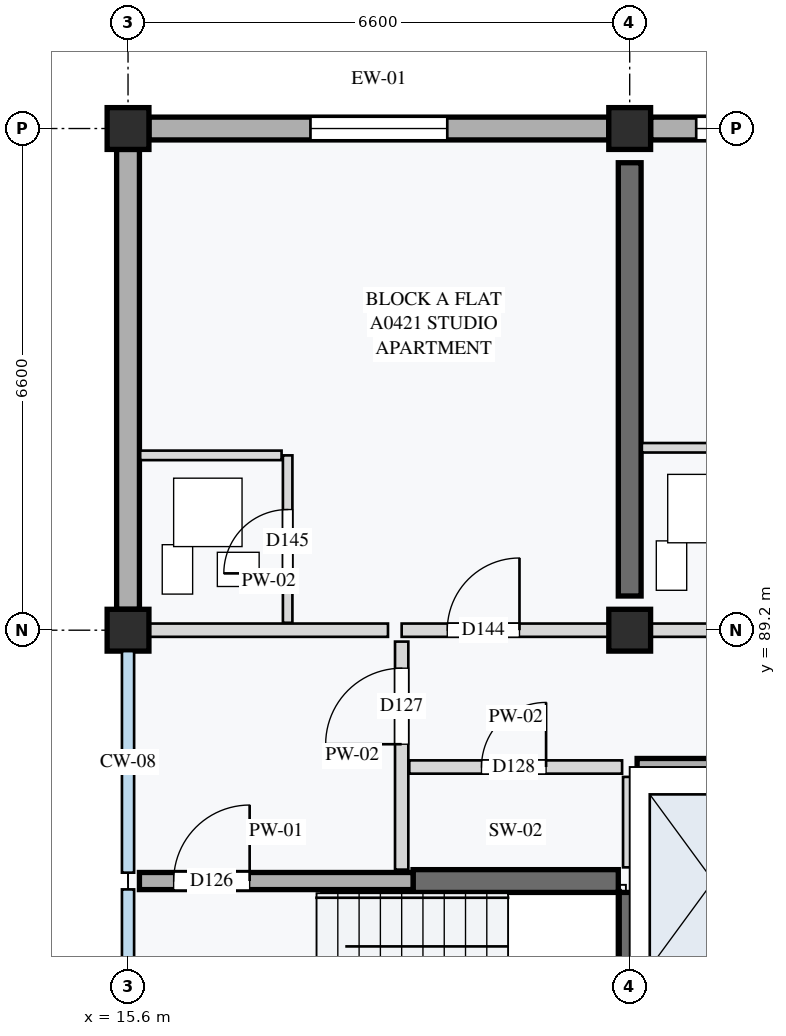
"""IFC4 building model, lengths in metres.
Left out: names, types, materials, properties, quantities, classifications, styles, units other than length and angle.
Written with IfcOpenShell. Run it as: python <this file> out.ifc"""

import sys

from ifc_helpers import new_model, si_unit, direction, frame, frame_2d, origin, origin_2d, place, context, subcontext, project, spatial, rectangle, extrude, element, fill, save


model = new_model("IFC4")
c1 = context("Model", 3, precision=1e-05, world=origin(), true_north=direction((0.0, 1.0)))
c2 = subcontext(c1, "Body", "Model", "MODEL_VIEW")
j1 = project(units=[si_unit("LENGTHUNIT", "METRE"), si_unit("PLANEANGLEUNIT", "RADIAN")], contexts=[c1])
p1 = place(None, origin())
s1 = spatial("IfcSite", under=j1, at=p1, CompositionType="ELEMENT")
p2 = place(p1, origin())
s2 = spatial("IfcBuilding", under=s1, at=p2, CompositionType="ELEMENT")
p3 = place(p2, frame((0.0, 0.0, 14.8)))
s3 = spatial("IfcBuildingStorey", under=s2, at=p3, CompositionType="ELEMENT", Elevation=14.8)
for number, where, z_axis, x_axis in (
    (1, (15.6, 89.2, 0.0), (0.0, 0.0, 1.0), (1.0, 0.0, 0.0)),
    (2, (15.6, 95.8, 0.0), (0.0, 0.0, 1.0), (1.0, 0.0, 0.0)),
    (3, (22.2, 89.2, 0.0), (0.0, 0.0, 1.0), (1.0, 0.0, 0.0)),
    (4, (22.2, 95.8, 0.0), (0.0, 0.0, 1.0), (1.0, 0.0, 0.0)),
):
    element("IfcColumn", number, at=place(p3, frame(where, z_axis=z_axis, x_axis=x_axis)), inside=s3, PredefinedType="COLUMN", context=c2, shape_type="SweptSolid", body=[
        extrude(rectangle(XDim=0.55, YDim=0.55, at=origin_2d()), origin(), (0.0, 0.0, 1.0), 3.2),
    ])
p4 = place(p3, frame((19.35, 85.9, 0.0), z_axis=(0.0, 0.0, 1.0), x_axis=(1.0, 0.0, 0.0)))
e5 = element("IfcWall", 5, at=p4, inside=s3, PredefinedType="SHEAR", context=c2, shape_type="SweptSolid", body=[
    extrude(rectangle(XDim=2.7, YDim=0.3, at=frame_2d((1.35, 0.0))), origin(), (0.0, 0.0, 1.0), 2.96),
])
p5 = place(p3, frame((22.2, 82.95, 0.0), z_axis=(0.0, 0.0, 1.0), x_axis=(0.0, 1.0, 0.0)))
e6 = element("IfcWall", 6, at=p5, inside=s3, PredefinedType="SHEAR", context=c2, shape_type="SweptSolid", body=[
    extrude(rectangle(XDim=2.8, YDim=0.3, at=frame_2d((1.4, 0.0))), origin(), (0.0, 0.0, 1.0), 2.96),
])
p6 = place(p3, frame((22.2, 89.65, 0.0), z_axis=(0.0, 0.0, 1.0), x_axis=(0.0, 1.0, 0.0)))
e7 = element("IfcWall", 7, at=p6, inside=s3, PredefinedType="SHEAR", context=c2, shape_type="SweptSolid", body=[
    extrude(rectangle(XDim=5.7, YDim=0.3, at=frame_2d((2.85, 0.0))), origin(), (0.0, 0.0, 1.0), 2.96),
])
p7 = place(p3, frame((15.875, 95.8, 0.0), z_axis=(0.0, 0.0, 1.0), x_axis=(1.0, 0.0, 0.0)))
e8 = element("IfcWall", 8, at=p7, inside=s3, PredefinedType="STANDARD", context=c2, shape_type="SweptSolid", body=[
    extrude(rectangle(XDim=6.05, YDim=0.3, at=frame_2d((3.025, 0.0))), origin(), (0.0, 0.0, 1.0), 2.6),
])
p8 = place(p7, frame((2.125, 0.0, 0.85)))
e9 = element("IfcOpeningElement", 9, at=p8, cuts=e8, PredefinedType="OPENING", context=c2, shape_type="SweptSolid", body=[
    extrude(rectangle(XDim=1.8, YDim=1.35, at=frame_2d((0.9, 0.675))), frame((0.0, 0.16, 0.0), z_axis=(0.0, -1.0, 0.0), x_axis=(1.0, 0.0, 0.0)), (0.0, 0.0, 1.0), 0.32),
])
p9 = place(p3, frame((22.475, 95.8, 0.0), z_axis=(0.0, 0.0, 1.0), x_axis=(1.0, 0.0, 0.0)))
e10 = element("IfcWall", 10, at=p9, inside=s3, PredefinedType="STANDARD", context=c2, shape_type="SweptSolid", body=[
    extrude(rectangle(XDim=6.05, YDim=0.3, at=frame_2d((3.025, 0.0))), origin(), (0.0, 0.0, 1.0), 2.6),
])
p10 = place(p9, frame((0.6, 0.0, 0.85)))
e11 = element("IfcOpeningElement", 11, at=p10, cuts=e10, PredefinedType="OPENING", context=c2, shape_type="SweptSolid", body=[
    extrude(rectangle(XDim=1.8, YDim=1.35, at=frame_2d((0.9, 0.675))), frame((0.0, 0.16, 0.0), z_axis=(0.0, -1.0, 0.0), x_axis=(1.0, 0.0, 0.0)), (0.0, 0.0, 1.0), 0.32),
])
p11 = place(p9, frame((4.025, 0.0, 0.85)))
e12 = element("IfcOpeningElement", 12, at=p11, cuts=e10, PredefinedType="OPENING", context=c2, shape_type="SweptSolid", body=[
    extrude(rectangle(XDim=1.5, YDim=1.35, at=frame_2d((0.75, 0.675))), frame((0.0, 0.16, 0.0), z_axis=(0.0, -1.0, 0.0), x_axis=(1.0, 0.0, 0.0)), (0.0, 0.0, 1.0), 0.32),
])
p12 = place(p3, frame((15.6, 89.475, 0.0), z_axis=(0.0, 0.0, 1.0), x_axis=(0.0, 1.0, 0.0)))
e13 = element("IfcWall", 13, at=p12, inside=s3, PredefinedType="STANDARD", context=c2, shape_type="SweptSolid", body=[
    extrude(rectangle(XDim=6.05, YDim=0.3, at=frame_2d((3.025, 0.0))), origin(), (0.0, 0.0, 1.0), 2.65),
])
p13 = place(p3, frame((15.75, 85.9, 0.0), z_axis=(0.0, 0.0, 1.0), x_axis=(1.0, 0.0, 0.0)))
e14 = element("IfcWall", 14, at=p13, inside=s3, PredefinedType="STANDARD", context=c2, shape_type="SweptSolid", body=[
    extrude(rectangle(XDim=3.6, YDim=0.225, at=frame_2d((1.8, 0.0))), origin(), (0.0, 0.0, 1.0), 2.96),
])
p14 = place(p13, frame((0.45, 0.0, 0.0)))
e15 = element("IfcOpeningElement", 15, at=p14, cuts=e14, PredefinedType="OPENING", context=c2, shape_type="SweptSolid", body=[
    extrude(rectangle(XDim=1.0, YDim=2.1, at=frame_2d((0.5, 1.05))), frame((0.0, 0.123, 0.0), z_axis=(0.0, -1.0, 0.0), x_axis=(1.0, 0.0, 0.0)), (0.0, 0.0, 1.0), 0.245),
])
p15 = place(p3, frame((19.2, 86.05, 0.0), z_axis=(0.0, 0.0, 1.0), x_axis=(0.0, 1.0, 0.0)))
e16 = element("IfcWall", 16, at=p15, inside=s3, PredefinedType="PARTITIONING", context=c2, shape_type="SweptSolid", body=[
    extrude(rectangle(XDim=3.0, YDim=0.175, at=frame_2d((1.5, 0.0))), origin(), (0.0, 0.0, 1.0), 2.96),
])
p16 = place(p15, frame((1.65, 0.0, 0.0)))
e17 = element("IfcOpeningElement", 17, at=p16, cuts=e16, PredefinedType="OPENING", context=c2, shape_type="SweptSolid", body=[
    extrude(rectangle(XDim=1.0, YDim=2.16, at=frame_2d((0.5, 1.08))), frame((0.0, 0.097, 0.0), z_axis=(0.0, -1.0, 0.0), x_axis=(1.0, 0.0, 0.0)), (0.0, 0.0, 1.0), 0.195),
])
p17 = place(p3, frame((19.3, 87.4, 0.0), z_axis=(0.0, 0.0, 1.0), x_axis=(1.0, 0.0, 0.0)))
e18 = element("IfcWall", 18, at=p17, inside=s3, PredefinedType="PARTITIONING", context=c2, shape_type="SweptSolid", body=[
    extrude(rectangle(XDim=2.8, YDim=0.175, at=frame_2d((1.4, 0.0))), origin(), (0.0, 0.0, 1.0), 2.96),
])
p18 = place(p17, frame((0.95, 0.0, 0.0)))
e19 = element("IfcOpeningElement", 19, at=p18, cuts=e18, PredefinedType="OPENING", context=c2, shape_type="SweptSolid", body=[
    extrude(rectangle(XDim=0.85, YDim=2.0, at=frame_2d((0.425, 1.0))), frame((0.0, 0.097, 0.0), z_axis=(0.0, -1.0, 0.0), x_axis=(1.0, 0.0, 0.0)), (0.0, 0.0, 1.0), 0.195),
])
p19 = place(p3, frame((22.2, 86.08, 0.0), z_axis=(0.0, 0.0, 1.0), x_axis=(0.0, 1.0, 0.0)))
e20 = element("IfcWall", 20, at=p19, inside=s3, PredefinedType="PARTITIONING", context=c2, shape_type="SweptSolid", body=[
    extrude(rectangle(XDim=1.19, YDim=0.175, at=frame_2d((0.595, 0.0))), origin(), (0.0, 0.0, 1.0), 2.96),
])
p20 = place(p3, frame((22.298, 87.4, 0.0), z_axis=(0.0, 0.0, 1.0), x_axis=(1.0, 0.0, 0.0)))
e21 = element("IfcWall", 21, at=p20, inside=s3, PredefinedType="STANDARD", context=c2, shape_type="SweptSolid", body=[
    extrude(rectangle(XDim=4.022, YDim=0.225, at=frame_2d((2.011, 0.0))), origin(), (0.0, 0.0, 1.0), 2.96),
])
p21 = place(p3, frame((15.88, 89.2, 0.0), z_axis=(0.0, 0.0, 1.0), x_axis=(1.0, 0.0, 0.0)))
e22 = element("IfcWall", 22, at=p21, inside=s3, PredefinedType="PARTITIONING", context=c2, shape_type="SweptSolid", body=[
    extrude(rectangle(XDim=3.14, YDim=0.175, at=frame_2d((1.57, 0.0))), origin(), (0.0, 0.0, 1.0), 2.7),
])
p22 = place(p3, frame((19.2, 89.2, 0.0), z_axis=(0.0, 0.0, 1.0), x_axis=(1.0, 0.0, 0.0)))
e23 = element("IfcWall", 23, at=p22, inside=s3, PredefinedType="PARTITIONING", context=c2, shape_type="SweptSolid", body=[
    extrude(rectangle(XDim=3.0, YDim=0.175, at=frame_2d((1.5, 0.0))), origin(), (0.0, 0.0, 1.0), 2.7),
])
p23 = place(p22, frame((0.6, 0.0, 0.0)))
e24 = element("IfcOpeningElement", 24, at=p23, cuts=e23, PredefinedType="OPENING", context=c2, shape_type="SweptSolid", body=[
    extrude(rectangle(XDim=0.95, YDim=2.16, at=frame_2d((0.475, 1.08))), frame((0.0, 0.097, 0.0), z_axis=(0.0, -1.0, 0.0), x_axis=(1.0, 0.0, 0.0)), (0.0, 0.0, 1.0), 0.195),
])
p24 = place(p3, frame((17.7, 89.298, 0.0), z_axis=(0.0, 0.0, 1.0), x_axis=(0.0, 1.0, 0.0)))
e25 = element("IfcWall", 25, at=p24, inside=s3, PredefinedType="PARTITIONING", context=c2, shape_type="SweptSolid", body=[
    extrude(rectangle(XDim=2.202, YDim=0.125, at=frame_2d((1.101, 0.0))), origin(), (0.0, 0.0, 1.0), 2.96),
])
p25 = place(p24, frame((0.65, 0.0, 0.0)))
e26 = element("IfcOpeningElement", 26, at=p25, cuts=e25, PredefinedType="OPENING", context=c2, shape_type="SweptSolid", body=[
    extrude(rectangle(XDim=0.84, YDim=2.06, at=frame_2d((0.42, 1.03))), frame((0.0, 0.073, 0.0), z_axis=(0.0, -1.0, 0.0), x_axis=(1.0, 0.0, 0.0)), (0.0, 0.0, 1.0), 0.145),
])
p26 = place(p3, frame((15.76, 91.5, 0.0), z_axis=(0.0, 0.0, 1.0), x_axis=(1.0, 0.0, 0.0)))
e27 = element("IfcWall", 27, at=p26, inside=s3, PredefinedType="PARTITIONING", context=c2, shape_type="SweptSolid", body=[
    extrude(rectangle(XDim=1.86, YDim=0.125, at=frame_2d((0.93, 0.0))), origin(), (0.0, 0.0, 1.0), 2.96),
])
p27 = place(p3, frame((22.2, 89.2, 0.0), z_axis=(0.0, 0.0, 1.0), x_axis=(1.0, 0.0, 0.0)))
e28 = element("IfcWall", 28, at=p27, inside=s3, PredefinedType="PARTITIONING", context=c2, shape_type="SweptSolid", body=[
    extrude(rectangle(XDim=6.6, YDim=0.175, at=frame_2d((3.3, 0.0))), origin(), (0.0, 0.0, 1.0), 2.7),
])
p28 = place(p27, frame((3.85, 0.0, 0.0)))
e29 = element("IfcOpeningElement", 29, at=p28, cuts=e28, PredefinedType="OPENING", context=c2, shape_type="SweptSolid", body=[
    extrude(rectangle(XDim=0.96, YDim=2.18, at=frame_2d((0.48, 1.09))), frame((0.0, 0.097, 0.0), z_axis=(0.0, -1.0, 0.0), x_axis=(1.0, 0.0, 0.0)), (0.0, 0.0, 1.0), 0.195),
])
p29 = place(p3, frame((22.36, 91.6, 0.0), z_axis=(0.0, 0.0, 1.0), x_axis=(1.0, 0.0, 0.0)))
e30 = element("IfcWall", 30, at=p29, inside=s3, PredefinedType="PARTITIONING", context=c2, shape_type="SweptSolid", body=[
    extrude(rectangle(XDim=1.66, YDim=0.125, at=frame_2d((0.83, 0.0))), origin(), (0.0, 0.0, 1.0), 2.96),
])
p30 = place(p8, origin())
e31 = element("IfcWindow", 31, at=p30, inside=s3, PartitioningType="SINGLE_PANEL", PredefinedType="WINDOW", context=c2, shape_type="SweptSolid", body=[
    extrude(rectangle(XDim=1.8, YDim=1.35, at=frame_2d((0.9, 0.675))), frame((0.0, 0.03, 0.0), z_axis=(0.0, -1.0, 0.0), x_axis=(1.0, 0.0, 0.0)), (0.0, 0.0, 1.0), 0.06),
])
fill(e9, e31)
p31 = place(p10, origin())
e32 = element("IfcWindow", 32, at=p31, inside=s3, PartitioningType="SINGLE_PANEL", PredefinedType="WINDOW", context=c2, shape_type="SweptSolid", body=[
    extrude(rectangle(XDim=1.8, YDim=1.35, at=frame_2d((0.9, 0.675))), frame((0.0, 0.03, 0.0), z_axis=(0.0, -1.0, 0.0), x_axis=(1.0, 0.0, 0.0)), (0.0, 0.0, 1.0), 0.06),
])
fill(e11, e32)
p32 = place(p14, origin())
e33 = element("IfcDoor", 33, at=p32, inside=s3, OperationType="SINGLE_SWING_RIGHT", PredefinedType="DOOR", context=c2, shape_type="SweptSolid", body=[
    extrude(rectangle(XDim=1.0, YDim=2.1, at=frame_2d((0.5, 1.05))), frame((0.0, 0.025, 0.0), z_axis=(0.0, -1.0, 0.0), x_axis=(1.0, 0.0, 0.0)), (0.0, 0.0, 1.0), 0.05),
])
fill(e15, e33)
p33 = place(p16, origin())
e34 = element("IfcDoor", 34, at=p33, inside=s3, OperationType="SINGLE_SWING_LEFT", PredefinedType="DOOR", context=c2, shape_type="SweptSolid", body=[
    extrude(rectangle(XDim=1.0, YDim=2.16, at=frame_2d((0.5, 1.08))), frame((0.0, 0.025, 0.0), z_axis=(0.0, -1.0, 0.0), x_axis=(1.0, 0.0, 0.0)), (0.0, 0.0, 1.0), 0.05),
])
fill(e17, e34)
p34 = place(p18, origin())
e35 = element("IfcDoor", 35, at=p34, inside=s3, OperationType="SINGLE_SWING_RIGHT", PredefinedType="DOOR", context=c2, shape_type="SweptSolid", body=[
    extrude(rectangle(XDim=0.85, YDim=2.0, at=frame_2d((0.425, 1.0))), frame((0.0, 0.025, 0.0), z_axis=(0.0, -1.0, 0.0), x_axis=(1.0, 0.0, 0.0)), (0.0, 0.0, 1.0), 0.05),
])
fill(e19, e35)
p35 = place(p23, origin())
e36 = element("IfcDoor", 36, at=p35, inside=s3, OperationType="SINGLE_SWING_RIGHT", PredefinedType="DOOR", context=c2, shape_type="SweptSolid", body=[
    extrude(rectangle(XDim=0.95, YDim=2.16, at=frame_2d((0.475, 1.08))), frame((0.0, 0.025, 0.0), z_axis=(0.0, -1.0, 0.0), x_axis=(1.0, 0.0, 0.0)), (0.0, 0.0, 1.0), 0.05),
])
fill(e24, e36)
p36 = place(p25, origin())
e37 = element("IfcDoor", 37, at=p36, inside=s3, OperationType="SINGLE_SWING_LEFT", PredefinedType="DOOR", context=c2, shape_type="SweptSolid", body=[
    extrude(rectangle(XDim=0.84, YDim=2.06, at=frame_2d((0.42, 1.03))), frame((0.0, 0.025, 0.0), z_axis=(0.0, -1.0, 0.0), x_axis=(1.0, 0.0, 0.0)), (0.0, 0.0, 1.0), 0.05),
])
fill(e26, e37)
save(model, sys.argv[1])
